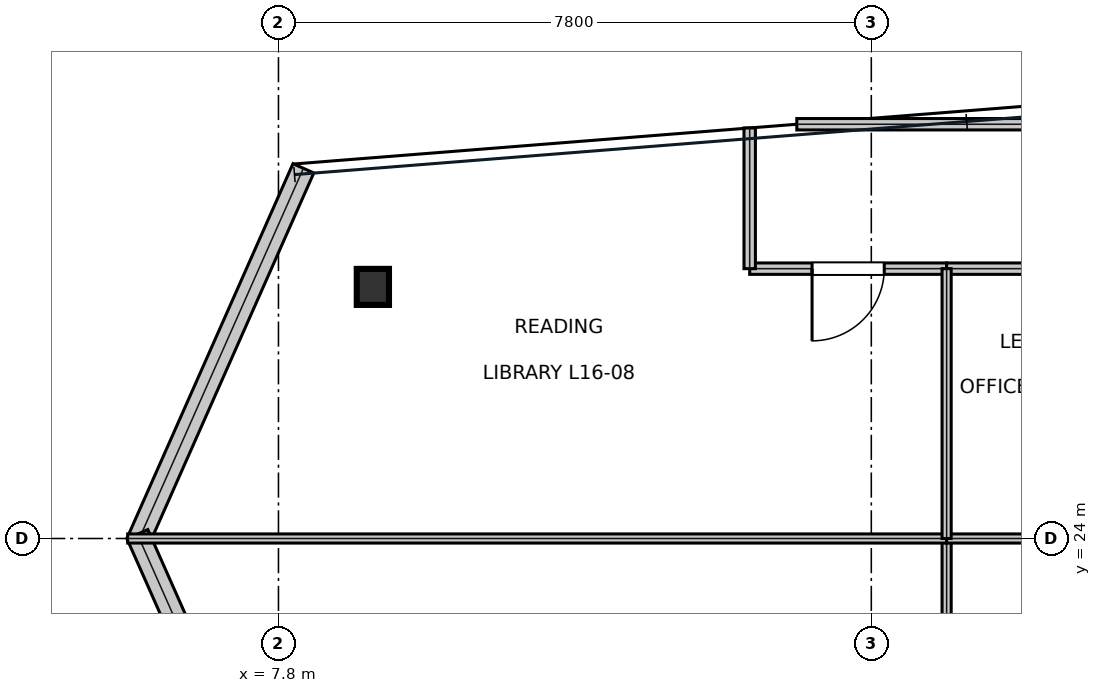
"""IFC4 building model, lengths in metres.
Left out: names, types, materials, properties, quantities, classifications, styles, units other than length and angle.
Written with IfcOpenShell. Run it as: python <this file> out.ifc"""

import sys

from ifc_helpers import new_model, si_unit, direction, frame, frame_2d, origin, origin_2d, place, context, subcontext, project, spatial, rectangle, i_section, extrude, element, fill, save


model = new_model("IFC4")
c1 = context("Model", 3, precision=1e-05, world=origin(), true_north=direction((0.0, 1.0)))
c2 = subcontext(c1, "Body", "Model", "MODEL_VIEW")
j1 = project(units=[si_unit("LENGTHUNIT", "METRE"), si_unit("PLANEANGLEUNIT", "RADIAN")], contexts=[c1])
p1 = place(None, origin())
s1 = spatial("IfcSite", under=j1, at=p1, CompositionType="ELEMENT")
p2 = place(p1, origin())
s2 = spatial("IfcBuilding", under=s1, at=p2, CompositionType="ELEMENT")
p3 = place(p2, frame((0.0, 0.0, 74.25)))
s3 = spatial("IfcBuildingStorey", under=s2, at=p3, CompositionType="ELEMENT", Elevation=74.25)
p4 = place(p3, frame((9.042, 27.31, 0.016), z_axis=(0.0, 0.0, 1.0), x_axis=(1.0, 0.0, 0.0)))
e1 = element("IfcColumn", 1, at=p4, inside=s3, PredefinedType="COLUMN", context=c2, shape_type="SweptSolid", body=[
    extrude(i_section(OverallWidth=0.424, OverallDepth=0.474, WebThickness=0.048, FlangeThickness=0.077, at=origin_2d()), origin(), (0.0, 0.0, 1.0), 4.018),
])
for number, where, z_axis, x_axis in (
    (2, (8.128, 28.87, 0.0), (0.0, 0.0, 1.0), (-0.405, -0.914, 0.0)),
    (3, (5.944, 24.057, 0.0), (0.0, 0.0, 1.0), (0.405, -0.914, 0.0)),
):
    element("IfcWall", number, at=place(p3, frame(where, z_axis=z_axis, x_axis=x_axis)), inside=s3, PredefinedType="STANDARD", context=c2, shape_type="SweptSolid", body=[
        extrude(rectangle(XDim=5.389, YDim=0.3, at=frame_2d((2.695, 0.0))), origin(), (0.0, 0.0, 1.0), 3.81),
    ])
p5 = place(p3, frame((14.0, 27.55, 0.0), z_axis=(0.0, 0.0, 1.0), x_axis=(1.0, 0.0, 0.0)))
e4 = element("IfcWall", 4, at=p5, inside=s3, PredefinedType="PARTITIONING", context=c2, shape_type="SweptSolid", body=[
    extrude(rectangle(XDim=2.591, YDim=0.15, at=frame_2d((1.295, 0.0))), origin(), (0.0, 0.0, 1.0), 3.81),
])
p6 = place(p5, frame((0.821, 0.0, 0.0)))
e5 = element("IfcOpeningElement", 5, at=p6, cuts=e4, PredefinedType="OPENING", context=c2, shape_type="SweptSolid", body=[
    extrude(rectangle(XDim=0.95, YDim=2.15, at=frame_2d((0.475, 1.075))), frame((0.0, 0.085, 0.0), z_axis=(0.0, -1.0, 0.0), x_axis=(1.0, 0.0, 0.0)), (0.0, 0.0, 1.0), 0.17),
])
p7 = place(p3, frame((14.62, 29.45, 0.0), z_axis=(0.0, 0.0, 1.0), x_axis=(1.0, 0.0, 0.0)))
e6 = element("IfcWall", 6, at=p7, inside=s3, PredefinedType="PARTITIONING", context=c2, shape_type="SweptSolid", body=[
    extrude(rectangle(XDim=17.364, YDim=0.15, at=frame_2d((8.682, 0.0))), origin(), (0.0, 0.0, 1.0), 3.181),
])
p8 = place(p7, frame((11.962, 0.0, 0.0)))
e7 = element("IfcOpeningElement", 7, at=p8, cuts=e6, PredefinedType="OPENING", context=c2, shape_type="SweptSolid", body=[
    extrude(rectangle(XDim=1.0, YDim=2.15, at=frame_2d((0.5, 1.075))), frame((0.0, 0.085, 0.0), z_axis=(0.0, -1.0, 0.0), x_axis=(1.0, 0.0, 0.0)), (0.0, 0.0, 1.0), 0.17),
])
p9 = place(p3, frame((16.591, 27.55, 0.0), z_axis=(0.0, 0.0, 1.0), x_axis=(1.0, 0.0, 0.0)))
e8 = element("IfcWall", 8, at=p9, inside=s3, PredefinedType="PARTITIONING", context=c2, shape_type="SweptSolid", body=[
    extrude(rectangle(XDim=2.909, YDim=0.15, at=frame_2d((1.455, 0.0))), origin(), (0.0, 0.0, 1.0), 3.391),
])
p10 = place(p3, frame((14.0, 27.55, 0.0), z_axis=(0.0, 0.0, 1.0), x_axis=(0.0, 1.0, 0.0)))
e9 = element("IfcWall", 9, at=p10, inside=s3, PredefinedType="PARTITIONING", context=c2, shape_type="SweptSolid", body=[
    extrude(rectangle(XDim=1.851, YDim=0.15, at=frame_2d((0.925, 0.0))), origin(), (0.0, 0.0, 1.0), 3.338),
])
p11 = place(p3, frame((16.591, 20.45, 0.0), z_axis=(0.0, 0.0, 1.0), x_axis=(0.0, 1.0, 0.0)))
e10 = element("IfcWall", 10, at=p11, inside=s3, PredefinedType="PARTITIONING", context=c2, shape_type="SweptSolid", body=[
    extrude(rectangle(XDim=3.55, YDim=0.12, at=frame_2d((1.775, 0.0))), origin(), (0.0, 0.0, 1.0), 3.181),
])
p12 = place(p3, frame((5.816, 24.0, 0.0), z_axis=(0.0, 0.0, 1.0), x_axis=(1.0, 0.0, 0.0)))
e11 = element("IfcWall", 11, at=p12, inside=s3, PredefinedType="PARTITIONING", context=c2, shape_type="SweptSolid", body=[
    extrude(rectangle(XDim=10.775, YDim=0.12, at=frame_2d((5.388, 0.0))), origin(), (0.0, 0.0, 1.0), 3.338),
])
p13 = place(p3, frame((16.591, 24.0, 0.0), z_axis=(0.0, 0.0, 1.0), x_axis=(1.0, 0.0, 0.0)))
e12 = element("IfcWall", 12, at=p13, inside=s3, PredefinedType="PARTITIONING", context=c2, shape_type="SweptSolid", body=[
    extrude(rectangle(XDim=2.909, YDim=0.12, at=frame_2d((1.455, 0.0))), origin(), (0.0, 0.0, 1.0), 3.391),
])
p14 = place(p3, frame((16.591, 24.0, 0.0), z_axis=(0.0, 0.0, 1.0), x_axis=(0.0, 1.0, 0.0)))
e13 = element("IfcWall", 13, at=p14, inside=s3, PredefinedType="PARTITIONING", context=c2, shape_type="SweptSolid", body=[
    extrude(rectangle(XDim=3.55, YDim=0.12, at=frame_2d((1.775, 0.0))), origin(), (0.0, 0.0, 1.0), 3.181),
])
p15 = place(p6, frame((0.95, 0.0, 0.0), z_axis=(0.0, 0.0, 1.0), x_axis=(-1.0, 0.0, 0.0)))
e14 = element("IfcDoor", 14, at=p15, inside=s3, OperationType="SINGLE_SWING_RIGHT", PredefinedType="DOOR", context=c2, shape_type="SweptSolid", body=[
    extrude(rectangle(XDim=0.95, YDim=2.15, at=frame_2d((0.475, 1.075))), frame((0.0, 0.025, 0.0), z_axis=(0.0, -1.0, 0.0), x_axis=(1.0, 0.0, 0.0)), (0.0, 0.0, 1.0), 0.05),
])
fill(e5, e14)
save(model, sys.argv[1])
